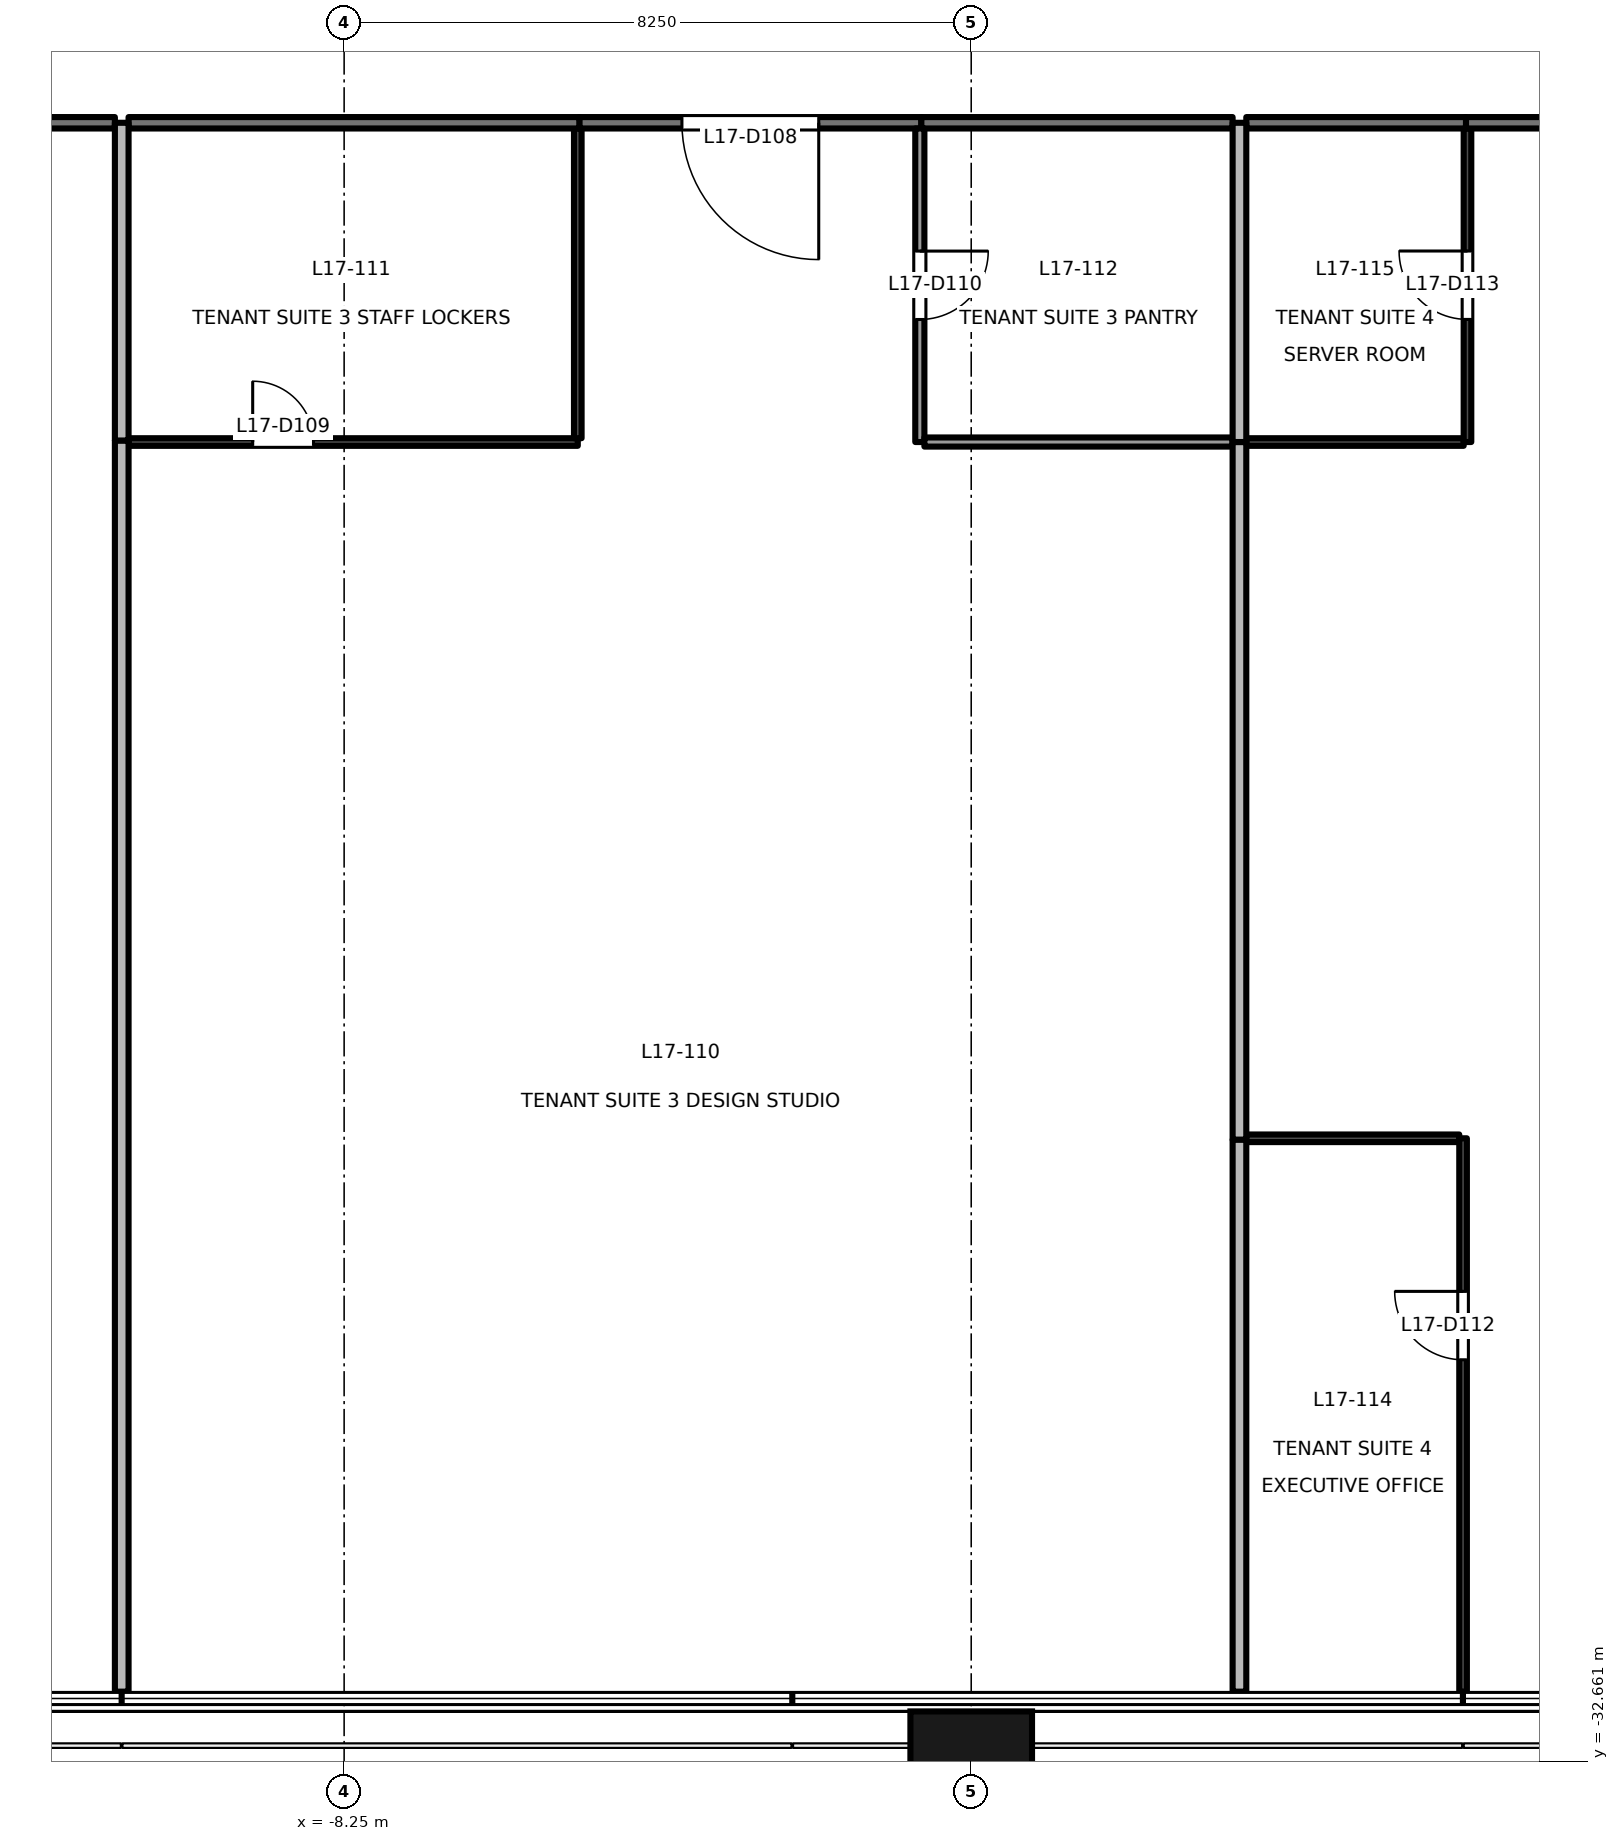
"""IFC4 building model, lengths in metres.
Left out: names, types, materials, properties, quantities, classifications, styles, units other than length and angle.
Written with IfcOpenShell. Run it as: python <this file> out.ifc"""

import sys

from ifc_helpers import new_model, si_unit, direction, frame, frame_2d, origin, origin_2d, place, context, subcontext, project, spatial, rectangle, extrude, element, fill, save


model = new_model("IFC4")
c1 = context("Model", 3, precision=1e-05, world=origin(), true_north=direction((0.0, 1.0)))
c2 = subcontext(c1, "Body", "Model", "MODEL_VIEW")
j1 = project(units=[si_unit("LENGTHUNIT", "METRE"), si_unit("PLANEANGLEUNIT", "RADIAN")], contexts=[c1])
p1 = place(None, origin())
s1 = spatial("IfcSite", under=j1, at=p1, CompositionType="ELEMENT")
p2 = place(p1, origin())
s2 = spatial("IfcBuilding", under=s1, at=p2, CompositionType="ELEMENT")
p3 = place(p2, frame((0.0, 0.0, 79.7)))
s3 = spatial("IfcBuildingStorey", under=s2, at=p3, CompositionType="ELEMENT", Elevation=79.7)
p4 = place(p3, frame((0.0, -32.9, -0.2), z_axis=(0.0, 0.0, 1.0), x_axis=(1.0, 0.0, 0.0)))
e1 = element("IfcColumn", 1, at=p4, inside=s3, PredefinedType="COLUMN", context=c2, shape_type="SweptSolid", body=[
    extrude(rectangle(XDim=1.6, YDim=1.8, at=origin_2d()), origin(), (0.0, 0.0, 1.0), 4.0),
])
p5 = place(p3, frame((-11.266, -11.1, 0.0), z_axis=(0.0, 0.0, 1.0), x_axis=(-1.0, 0.0, 0.0)))
e2 = element("IfcWall", 2, at=p5, inside=s3, PredefinedType="PARTITIONING", context=c2, shape_type="SweptSolid", body=[
    extrude(rectangle(XDim=6.754, YDim=0.15, at=frame_2d((3.377, 0.0))), origin(), (0.0, 0.0, 1.0), 2.8),
])
p6 = place(p5, frame((1.438, 0.0, 0.0)))
e3 = element("IfcOpeningElement", 3, at=p6, cuts=e2, PredefinedType="OPENING", context=c2, shape_type="SweptSolid", body=[
    extrude(rectangle(XDim=1.5, YDim=2.1, at=frame_2d((0.75, 1.05))), frame((0.0, 0.085, 0.0), z_axis=(0.0, -1.0, 0.0), x_axis=(1.0, 0.0, 0.0)), (0.0, 0.0, 1.0), 0.171),
])
p7 = place(p3, frame((-0.656, -11.1, 0.0), z_axis=(0.0, 0.0, 1.0), x_axis=(-1.0, 0.0, 0.0)))
e4 = element("IfcWall", 4, at=p7, inside=s3, PredefinedType="PARTITIONING", context=c2, shape_type="SweptSolid", body=[
    extrude(rectangle(XDim=4.5, YDim=0.15, at=frame_2d((2.25, 0.0))), origin(), (0.0, 0.0, 1.0), 2.8),
])
p8 = place(p7, frame((1.35, 0.0, 0.0)))
e5 = element("IfcOpeningElement", 5, at=p8, cuts=e4, PredefinedType="OPENING", context=c2, shape_type="SweptSolid", body=[
    extrude(rectangle(XDim=1.8, YDim=2.1, at=frame_2d((0.9, 1.05))), frame((0.0, 0.085, 0.0), z_axis=(0.0, -1.0, 0.0), x_axis=(1.0, 0.0, 0.0)), (0.0, 0.0, 1.0), 0.171),
])
p9 = place(p3, frame((-5.156, -11.1, 0.0), z_axis=(0.0, 0.0, 1.0), x_axis=(-1.0, 0.0, 0.0)))
e6 = element("IfcWall", 6, at=p9, inside=s3, PredefinedType="PARTITIONING", context=c2, shape_type="SweptSolid", body=[
    extrude(rectangle(XDim=5.93, YDim=0.15, at=frame_2d((2.965, 0.0))), origin(), (0.0, 0.0, 1.0), 2.8),
])
p10 = place(p3, frame((3.439, -11.1, 0.0), z_axis=(0.0, 0.0, 1.0), x_axis=(-1.0, 0.0, 0.0)))
e7 = element("IfcWall", 7, at=p10, inside=s3, PredefinedType="PARTITIONING", context=c2, shape_type="SweptSolid", body=[
    extrude(rectangle(XDim=4.095, YDim=0.15, at=frame_2d((2.047, 0.0))), origin(), (0.0, 0.0, 1.0), 2.8),
])
p11 = place(p3, frame((12.549, -11.1, 0.0), z_axis=(0.0, 0.0, 1.0), x_axis=(-1.0, 0.0, 0.0)))
e8 = element("IfcWall", 8, at=p11, inside=s3, PredefinedType="PARTITIONING", context=c2, shape_type="SweptSolid", body=[
    extrude(rectangle(XDim=6.04, YDim=0.15, at=frame_2d((3.02, 0.0))), origin(), (0.0, 0.0, 1.0), 2.8),
])
p12 = place(p11, frame((2.12, 0.0, 0.0)))
e9 = element("IfcOpeningElement", 9, at=p12, cuts=e8, PredefinedType="OPENING", context=c2, shape_type="SweptSolid", body=[
    extrude(rectangle(XDim=1.8, YDim=2.1, at=frame_2d((0.9, 1.05))), frame((0.0, 0.085, 0.0), z_axis=(0.0, -1.0, 0.0), x_axis=(1.0, 0.0, 0.0)), (0.0, 0.0, 1.0), 0.171),
])
p13 = place(p3, frame((6.509, -11.1, 0.0), z_axis=(0.0, 0.0, 1.0), x_axis=(-1.0, 0.0, 0.0)))
e10 = element("IfcWall", 10, at=p13, inside=s3, PredefinedType="PARTITIONING", context=c2, shape_type="SweptSolid", body=[
    extrude(rectangle(XDim=2.89, YDim=0.15, at=frame_2d((1.445, 0.0))), origin(), (0.0, 0.0, 1.0), 2.8),
])
p14 = place(p3, frame((-11.176, -15.28, 0.0), z_axis=(0.0, 0.0, 1.0), x_axis=(0.0, -1.0, 0.0)))
e11 = element("IfcWall", 11, at=p14, inside=s3, PredefinedType="PARTITIONING", context=c2, shape_type="SweptSolid", body=[
    extrude(rectangle(XDim=16.46, YDim=0.18, at=frame_2d((8.23, 0.0))), origin(), (0.0, 0.0, 1.0), 3.8),
])
p15 = place(p3, frame((-11.176, -11.1, 0.0), z_axis=(0.0, 0.0, 1.0), x_axis=(0.0, -1.0, 0.0)))
e12 = element("IfcWall", 12, at=p15, inside=s3, PredefinedType="PARTITIONING", context=c2, shape_type="SweptSolid", body=[
    extrude(rectangle(XDim=4.18, YDim=0.18, at=frame_2d((2.09, 0.0))), origin(), (0.0, 0.0, 1.0), 3.8),
])
p16 = place(p3, frame((-11.086, -15.3, 0.0), z_axis=(0.0, 0.0, 1.0), x_axis=(1.0, 0.0, 0.0)))
e13 = element("IfcWall", 13, at=p16, inside=s3, PredefinedType="PARTITIONING", context=c2, shape_type="SweptSolid", body=[
    extrude(rectangle(XDim=5.91, YDim=0.1, at=frame_2d((2.955, 0.0))), origin(), (0.0, 0.0, 1.0), 2.8),
])
p17 = place(p16, frame((1.633, 0.0, 0.0)))
e14 = element("IfcOpeningElement", 14, at=p17, cuts=e13, PredefinedType="OPENING", context=c2, shape_type="SweptSolid", body=[
    extrude(rectangle(XDim=0.8, YDim=2.1, at=frame_2d((0.4, 1.05))), frame((0.0, 0.061, 0.0), z_axis=(0.0, -1.0, 0.0), x_axis=(1.0, 0.0, 0.0)), (0.0, 0.0, 1.0), 0.121),
])
p18 = place(p3, frame((-5.176, -15.25, 0.0), z_axis=(0.0, 0.0, 1.0), x_axis=(0.0, 1.0, 0.0)))
e15 = element("IfcWall", 15, at=p18, inside=s3, PredefinedType="PARTITIONING", context=c2, shape_type="SweptSolid", body=[
    extrude(rectangle(XDim=4.075, YDim=0.1, at=frame_2d((2.038, 0.0))), origin(), (0.0, 0.0, 1.0), 3.8),
])
p19 = place(p3, frame((-0.676, -11.175, 0.0), z_axis=(0.0, 0.0, 1.0), x_axis=(0.0, -1.0, 0.0)))
e16 = element("IfcWall", 16, at=p19, inside=s3, PredefinedType="PARTITIONING", context=c2, shape_type="SweptSolid", body=[
    extrude(rectangle(XDim=4.125, YDim=0.12, at=frame_2d((2.062, 0.0))), origin(), (0.0, 0.0, 1.0), 3.8),
])
p20 = place(p19, frame((1.613, 0.0, 0.0)))
e17 = element("IfcOpeningElement", 17, at=p20, cuts=e16, PredefinedType="OPENING", context=c2, shape_type="SweptSolid", body=[
    extrude(rectangle(XDim=0.9, YDim=2.1, at=frame_2d((0.45, 1.05))), frame((0.0, 0.071, 0.0), z_axis=(0.0, -1.0, 0.0), x_axis=(1.0, 0.0, 0.0)), (0.0, 0.0, 1.0), 0.141),
])
p21 = place(p3, frame((-0.616, -15.3, 0.0), z_axis=(0.0, 0.0, 1.0), x_axis=(1.0, 0.0, 0.0)))
e18 = element("IfcWall", 18, at=p21, inside=s3, PredefinedType="PARTITIONING", context=c2, shape_type="SweptSolid", body=[
    extrude(rectangle(XDim=4.055, YDim=0.12, at=frame_2d((2.027, 0.0))), origin(), (0.0, 0.0, 1.0), 2.8),
])
p22 = place(p3, frame((3.529, -15.3, 0.0), z_axis=(0.0, 0.0, 1.0), x_axis=(0.0, -1.0, 0.0)))
e19 = element("IfcWall", 19, at=p22, inside=s3, PredefinedType="PARTITIONING", context=c2, shape_type="SweptSolid", body=[
    extrude(rectangle(XDim=9.18, YDim=0.18, at=frame_2d((4.59, 0.0))), origin(), (0.0, 0.0, 1.0), 3.8),
])
p23 = place(p3, frame((3.529, -24.48, 0.0), z_axis=(0.0, 0.0, 1.0), x_axis=(0.0, -1.0, 0.0)))
e20 = element("IfcWall", 20, at=p23, inside=s3, PredefinedType="PARTITIONING", context=c2, shape_type="SweptSolid", body=[
    extrude(rectangle(XDim=7.26, YDim=0.18, at=frame_2d((3.63, 0.0))), origin(), (0.0, 0.0, 1.0), 3.8),
])
p24 = place(p3, frame((3.529, -11.1, 0.0), z_axis=(0.0, 0.0, 1.0), x_axis=(0.0, -1.0, 0.0)))
e21 = element("IfcWall", 21, at=p24, inside=s3, PredefinedType="PARTITIONING", context=c2, shape_type="SweptSolid", body=[
    extrude(rectangle(XDim=4.2, YDim=0.18, at=frame_2d((2.1, 0.0))), origin(), (0.0, 0.0, 1.0), 3.8),
])
p25 = place(p3, frame((6.421, -24.46, 0.0), z_axis=(0.0, 0.0, 1.0), x_axis=(-1.0, 0.0, 0.0)))
e22 = element("IfcWall", 22, at=p25, inside=s3, PredefinedType="PARTITIONING", context=c2, shape_type="SweptSolid", body=[
    extrude(rectangle(XDim=2.802, YDim=0.1, at=frame_2d((1.401, 0.0))), origin(), (0.0, 0.0, 1.0), 2.8),
])
p26 = place(p3, frame((6.471, -31.74, 0.0), z_axis=(0.0, 0.0, 1.0), x_axis=(0.0, 1.0, 0.0)))
e23 = element("IfcWall", 23, at=p26, inside=s3, PredefinedType="PARTITIONING", context=c2, shape_type="SweptSolid", body=[
    extrude(rectangle(XDim=7.28, YDim=0.1, at=frame_2d((3.64, 0.0))), origin(), (0.0, 0.0, 1.0), 3.8),
])
p27 = place(p26, frame((4.366, 0.0, 0.0)))
e24 = element("IfcOpeningElement", 24, at=p27, cuts=e23, PredefinedType="OPENING", context=c2, shape_type="SweptSolid", body=[
    extrude(rectangle(XDim=0.9, YDim=2.1, at=frame_2d((0.45, 1.05))), frame((0.0, 0.061, 0.0), z_axis=(0.0, -1.0, 0.0), x_axis=(1.0, 0.0, 0.0)), (0.0, 0.0, 1.0), 0.121),
])
p28 = place(p3, frame((3.619, -15.3, 0.0), z_axis=(0.0, 0.0, 1.0), x_axis=(1.0, 0.0, 0.0)))
e25 = element("IfcWall", 25, at=p28, inside=s3, PredefinedType="PARTITIONING", context=c2, shape_type="SweptSolid", body=[
    extrude(rectangle(XDim=2.86, YDim=0.1, at=frame_2d((1.43, 0.0))), origin(), (0.0, 0.0, 1.0), 2.8),
])
p29 = place(p3, frame((6.529, -15.3, 0.0), z_axis=(0.0, 0.0, 1.0), x_axis=(0.0, 1.0, 0.0)))
e26 = element("IfcWall", 26, at=p29, inside=s3, PredefinedType="PARTITIONING", context=c2, shape_type="SweptSolid", body=[
    extrude(rectangle(XDim=4.125, YDim=0.1, at=frame_2d((2.062, 0.0))), origin(), (0.0, 0.0, 1.0), 3.8),
])
p30 = place(p29, frame((1.613, 0.0, 0.0)))
e27 = element("IfcOpeningElement", 27, at=p30, cuts=e26, PredefinedType="OPENING", context=c2, shape_type="SweptSolid", body=[
    extrude(rectangle(XDim=0.9, YDim=2.1, at=frame_2d((0.45, 1.05))), frame((0.0, 0.061, 0.0), z_axis=(0.0, -1.0, 0.0), x_axis=(1.0, 0.0, 0.0)), (0.0, 0.0, 1.0), 0.121),
])
p31 = place(p8, origin())
e28 = element("IfcDoor", 28, at=p31, inside=s3, OperationType="DOUBLE_DOOR_SINGLE_SWING", PredefinedType="DOOR", context=c2, shape_type="SweptSolid", body=[
    extrude(rectangle(XDim=1.8, YDim=2.1, at=frame_2d((0.9, 1.05))), frame((0.0, 0.025, 0.0), z_axis=(0.0, -1.0, 0.0), x_axis=(1.0, 0.0, 0.0)), (0.0, 0.0, 1.0), 0.05),
])
fill(e5, e28)
p32 = place(p17, origin())
e29 = element("IfcDoor", 29, at=p32, inside=s3, OperationType="SINGLE_SWING_LEFT", PredefinedType="DOOR", context=c2, shape_type="SweptSolid", body=[
    extrude(rectangle(XDim=0.8, YDim=2.1, at=frame_2d((0.4, 1.05))), frame((0.0, 0.025, 0.0), z_axis=(0.0, -1.0, 0.0), x_axis=(1.0, 0.0, 0.0)), (0.0, 0.0, 1.0), 0.05),
])
fill(e14, e29)
p33 = place(p20, origin())
e30 = element("IfcDoor", 30, at=p33, inside=s3, OperationType="SINGLE_SWING_LEFT", PredefinedType="DOOR", context=c2, shape_type="SweptSolid", body=[
    extrude(rectangle(XDim=0.9, YDim=2.1, at=frame_2d((0.45, 1.05))), frame((0.0, 0.025, 0.0), z_axis=(0.0, -1.0, 0.0), x_axis=(1.0, 0.0, 0.0)), (0.0, 0.0, 1.0), 0.05),
])
fill(e17, e30)
p34 = place(p27, origin())
e31 = element("IfcDoor", 31, at=p34, inside=s3, OperationType="SINGLE_SWING_RIGHT", PredefinedType="DOOR", context=c2, shape_type="SweptSolid", body=[
    extrude(rectangle(XDim=0.9, YDim=2.1, at=frame_2d((0.45, 1.05))), frame((0.0, 0.025, 0.0), z_axis=(0.0, -1.0, 0.0), x_axis=(1.0, 0.0, 0.0)), (0.0, 0.0, 1.0), 0.05),
])
fill(e24, e31)
p35 = place(p30, origin())
e32 = element("IfcDoor", 32, at=p35, inside=s3, OperationType="SINGLE_SWING_RIGHT", PredefinedType="DOOR", context=c2, shape_type="SweptSolid", body=[
    extrude(rectangle(XDim=0.9, YDim=2.1, at=frame_2d((0.45, 1.05))), frame((0.0, 0.025, 0.0), z_axis=(0.0, -1.0, 0.0), x_axis=(1.0, 0.0, 0.0)), (0.0, 0.0, 1.0), 0.05),
])
fill(e27, e32)
save(model, sys.argv[1])
